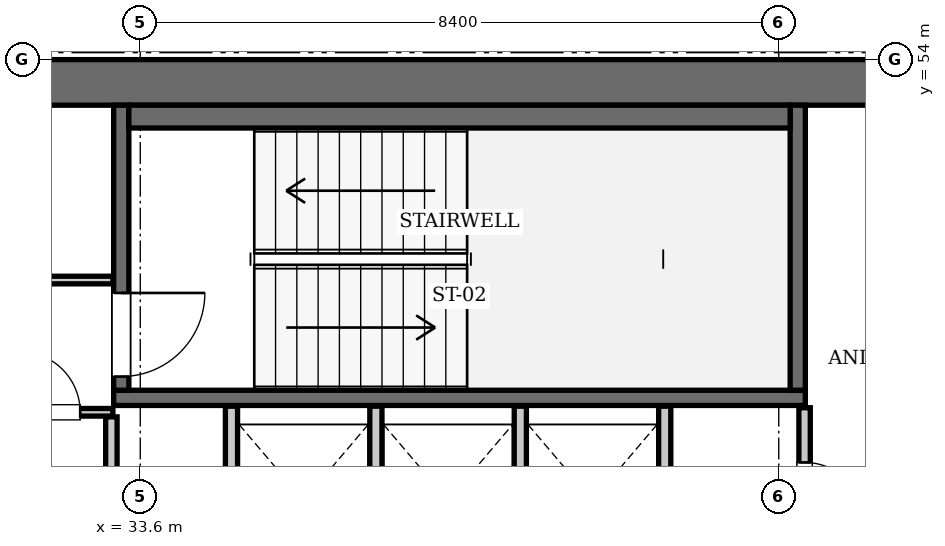
"""IFC4 building model, lengths in metres.
Left out: names, types, materials, properties, quantities, classifications, styles, units other than length and angle.
Written with IfcOpenShell. Run it as: python <this file> out.ifc"""

import sys

from ifc_helpers import new_model, si_unit, direction, frame, frame_2d, origin, place, context, subcontext, project, spatial, rectangle, extrude, element, fill, save


model = new_model("IFC4")
c1 = context("Model", 3, precision=1e-05, world=origin(), true_north=direction((0.0, 1.0)))
c2 = subcontext(c1, "Body", "Model", "MODEL_VIEW")
j1 = project(units=[si_unit("LENGTHUNIT", "METRE"), si_unit("PLANEANGLEUNIT", "RADIAN")], contexts=[c1])
p1 = place(None, origin())
s1 = spatial("IfcSite", under=j1, at=p1, CompositionType="ELEMENT")
p2 = place(p1, origin())
s2 = spatial("IfcBuilding", under=s1, at=p2, CompositionType="ELEMENT")
p3 = place(p2, frame((0.0, 0.0, 266.35)))
s3 = spatial("IfcBuildingStorey", under=s2, at=p3, CompositionType="ELEMENT", Elevation=266.35)
p4 = place(p3, frame((25.2, 53.7, 0.0), z_axis=(0.0, 0.0, 1.0), x_axis=(1.0, 0.0, 0.0)))
e1 = element("IfcWall", 1, at=p4, inside=s3, PredefinedType="SHEAR", context=c2, shape_type="SweptSolid", body=[
    extrude(rectangle(XDim=25.2, YDim=0.6, at=frame_2d((12.6, 0.0))), origin(), (0.0, 0.0, 1.0), 3.85),
])
p5 = place(p3, frame((33.25, 49.55, 0.0), z_axis=(0.0, 0.0, 1.0), x_axis=(1.0, 0.0, 0.0)))
e2 = element("IfcWall", 2, at=p5, inside=s3, PredefinedType="SOLIDWALL", context=c2, shape_type="SweptSolid", body=[
    extrude(rectangle(XDim=9.1, YDim=0.2, at=frame_2d((4.55, 0.0))), origin(), (0.0, 0.0, 1.0), 3.61),
])
p6 = place(p3, frame((42.25, 49.65, 0.0), z_axis=(0.0, 0.0, 1.0), x_axis=(0.0, 1.0, 0.0)))
e3 = element("IfcWall", 3, at=p6, inside=s3, PredefinedType="SOLIDWALL", context=c2, shape_type="SweptSolid", body=[
    extrude(rectangle(XDim=3.75, YDim=0.2, at=frame_2d((1.875, 0.0))), origin(), (0.0, 0.0, 1.0), 3.61),
])
p7 = place(p3, frame((33.35, 49.65, 0.0), z_axis=(0.0, 0.0, 1.0), x_axis=(0.0, 1.0, 0.0)))
e4 = element("IfcWall", 4, at=p7, inside=s3, PredefinedType="SOLIDWALL", context=c2, shape_type="SweptSolid", body=[
    extrude(rectangle(XDim=3.75, YDim=0.2, at=frame_2d((1.875, 0.0))), origin(), (0.0, 0.0, 1.0), 3.61),
])
p8 = place(p7, frame((0.18, 0.0, 0.0)))
e5 = element("IfcOpeningElement", 5, at=p8, cuts=e4, PredefinedType="OPENING", context=c2, shape_type="SweptSolid", body=[
    extrude(rectangle(XDim=1.1, YDim=2.15, at=frame_2d((0.55, 1.075))), frame((0.0, 0.11, 0.0), z_axis=(0.0, -1.0, 0.0), x_axis=(1.0, 0.0, 0.0)), (0.0, 0.0, 1.0), 0.22),
])
p9 = place(p3, frame((33.45, 53.25, 0.0), z_axis=(0.0, 0.0, 1.0), x_axis=(1.0, 0.0, 0.0)))
e6 = element("IfcWall", 6, at=p9, inside=s3, PredefinedType="SOLIDWALL", context=c2, shape_type="SweptSolid", body=[
    extrude(rectangle(XDim=8.7, YDim=0.3, at=frame_2d((4.35, 0.0))), origin(), (0.0, 0.0, 1.0), 3.61),
])
for number, where, z_axis, x_axis in (
    (7, (34.8, 47.25, 0.0), (0.0, 0.0, 1.0), (0.0, 1.0, 0.0)),
    (8, (36.7, 47.25, 0.0), (0.0, 0.0, 1.0), (0.0, 1.0, 0.0)),
    (9, (38.6, 47.25, 0.0), (0.0, 0.0, 1.0), (0.0, 1.0, 0.0)),
    (10, (40.5, 47.25, 0.0), (0.0, 0.0, 1.0), (0.0, 1.0, 0.0)),
):
    element("IfcWall", number, at=place(p3, frame(where, z_axis=z_axis, x_axis=x_axis)), inside=s3, PredefinedType="SOLIDWALL", context=c2, shape_type="SweptSolid", body=[
        extrude(rectangle(XDim=2.19, YDim=0.16, at=frame_2d((1.095, 0.0))), origin(), (0.0, 0.0, 1.0), 3.61),
    ])
p10 = place(p3, frame((33.22, 45.14, 0.0), z_axis=(0.0, 0.0, 1.0), x_axis=(0.0, 1.0, 0.0)))
e11 = element("IfcWall", 11, at=p10, inside=s3, PredefinedType="PARTITIONING", context=c2, shape_type="SweptSolid", body=[
    extrude(rectangle(XDim=4.16, YDim=0.15, at=frame_2d((2.08, 0.0))), origin(), (0.0, 0.0, 1.0), 3.61),
])
p11 = place(p3, frame((30.06, 49.36, 0.0), z_axis=(0.0, 0.0, 1.0), x_axis=(1.0, 0.0, 0.0)))
e12 = element("IfcWall", 12, at=p11, inside=s3, PredefinedType="PARTITIONING", context=c2, shape_type="SweptSolid", body=[
    extrude(rectangle(XDim=3.18, YDim=0.1, at=frame_2d((1.59, 0.0))), origin(), (0.0, 0.0, 1.0), 3.61),
])
p12 = place(p11, frame((1.95, 0.0, 0.0)))
e13 = element("IfcOpeningElement", 13, at=p12, cuts=e12, PredefinedType="OPENING", context=c2, shape_type="SweptSolid", body=[
    extrude(rectangle(XDim=0.8, YDim=2.05, at=frame_2d((0.4, 1.025))), frame((0.0, 0.06, 0.0), z_axis=(0.0, -1.0, 0.0), x_axis=(1.0, 0.0, 0.0)), (0.0, 0.0, 1.0), 0.12),
])
p13 = place(p3, frame((31.82, 51.1, 0.0), z_axis=(0.0, 0.0, 1.0), x_axis=(1.0, 0.0, 0.0)))
e14 = element("IfcWall", 14, at=p13, inside=s3, PredefinedType="PARTITIONING", context=c2, shape_type="SweptSolid", body=[
    extrude(rectangle(XDim=1.42, YDim=0.1, at=frame_2d((0.71, 0.0))), origin(), (0.0, 0.0, 1.0), 3.61),
])
p14 = place(p3, frame((42.34, 47.66, 0.0), z_axis=(0.0, 0.0, 1.0), x_axis=(0.0, 1.0, 0.0)))
e15 = element("IfcWall", 15, at=p14, inside=s3, PredefinedType="PARTITIONING", context=c2, shape_type="SweptSolid", body=[
    extrude(rectangle(XDim=1.76, YDim=0.15, at=frame_2d((0.88, 0.0))), origin(), (0.0, 0.0, 1.0), 3.61),
])
p15 = place(p14, frame((0.24, 0.0, 0.0)))
e16 = element("IfcOpeningElement", 16, at=p15, cuts=e15, PredefinedType="OPENING", context=c2, shape_type="SweptSolid", body=[
    extrude(rectangle(XDim=0.8, YDim=2.05, at=frame_2d((0.4, 1.025))), frame((0.0, 0.085, 0.0), z_axis=(0.0, -1.0, 0.0), x_axis=(1.0, 0.0, 0.0)), (0.0, 0.0, 1.0), 0.17),
])
p16 = place(p8, frame((1.1, 0.0, 0.0), z_axis=(0.0, 0.0, 1.0), x_axis=(-1.0, 0.0, 0.0)))
e17 = element("IfcDoor", 17, at=p16, inside=s3, OperationType="SINGLE_SWING_LEFT", PredefinedType="DOOR", context=c2, shape_type="SweptSolid", body=[
    extrude(rectangle(XDim=1.1, YDim=2.15, at=frame_2d((0.55, 1.075))), frame((0.0, 0.025, 0.0), z_axis=(0.0, -1.0, 0.0), x_axis=(1.0, 0.0, 0.0)), (0.0, 0.0, 1.0), 0.05),
])
fill(e5, e17)
p17 = place(p12, origin())
e18 = element("IfcDoor", 18, at=p17, inside=s3, OperationType="SINGLE_SWING_LEFT", PredefinedType="DOOR", context=c2, shape_type="SweptSolid", body=[
    extrude(rectangle(XDim=0.8, YDim=2.05, at=frame_2d((0.4, 1.025))), frame((0.0, 0.025, 0.0), z_axis=(0.0, -1.0, 0.0), x_axis=(1.0, 0.0, 0.0)), (0.0, 0.0, 1.0), 0.05),
])
fill(e13, e18)
p18 = place(p15, frame((0.8, 0.0, 0.0), z_axis=(0.0, 0.0, 1.0), x_axis=(-1.0, 0.0, 0.0)))
e19 = element("IfcDoor", 19, at=p18, inside=s3, OperationType="SINGLE_SWING_RIGHT", PredefinedType="DOOR", context=c2, shape_type="SweptSolid", body=[
    extrude(rectangle(XDim=0.8, YDim=2.05, at=frame_2d((0.4, 1.025))), frame((0.0, 0.025, 0.0), z_axis=(0.0, -1.0, 0.0), x_axis=(1.0, 0.0, 0.0)), (0.0, 0.0, 1.0), 0.05),
])
fill(e16, e19)
save(model, sys.argv[1])
